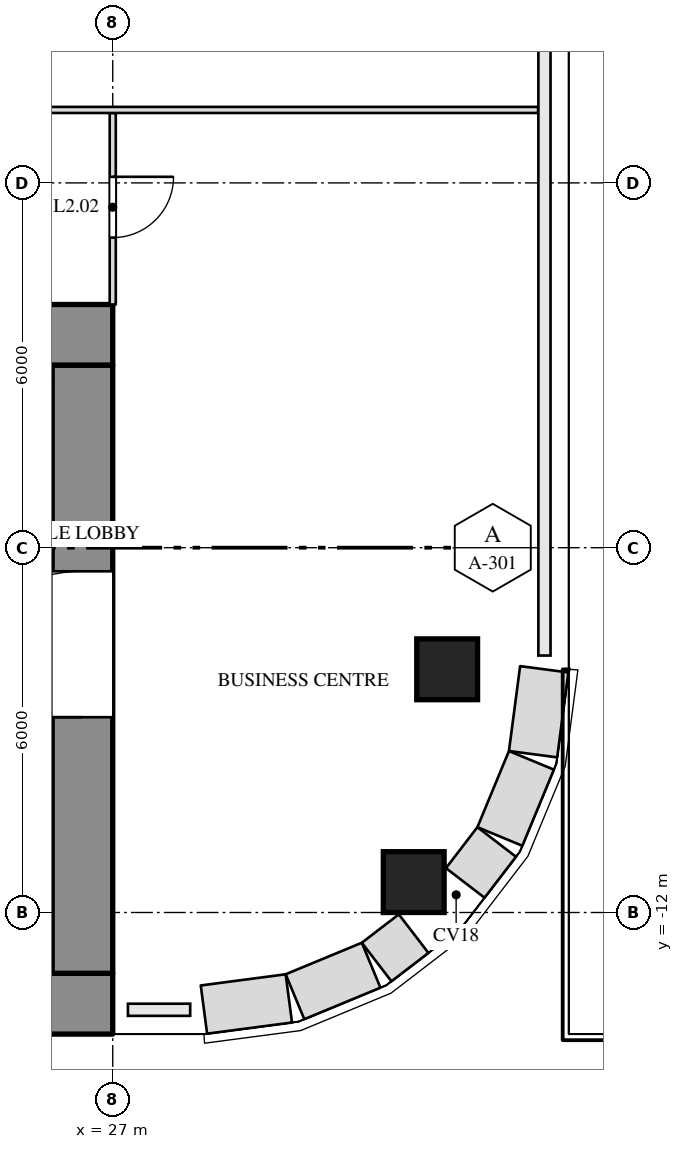
"""IFC4 building model, lengths in metres.
Left out: names, types, materials, properties, quantities, classifications, styles, units other than length and angle.
Written with IfcOpenShell. Run it as: python <this file> out.ifc"""

import sys

from ifc_helpers import new_model, si_unit, direction, frame, frame_2d, origin, origin_2d, place, context, subcontext, project, spatial, rectangle, extrude, element, fill, save


model = new_model("IFC4")
c1 = context("Model", 3, precision=1e-05, world=origin(), true_north=direction((0.0, 1.0)))
c2 = subcontext(c1, "Body", "Model", "MODEL_VIEW")
j1 = project(units=[si_unit("LENGTHUNIT", "METRE"), si_unit("PLANEANGLEUNIT", "RADIAN")], contexts=[c1])
p1 = place(None, origin())
s1 = spatial("IfcSite", under=j1, at=p1, CompositionType="ELEMENT")
p2 = place(p1, origin())
s2 = spatial("IfcBuilding", under=s1, at=p2, CompositionType="ELEMENT")
p3 = place(p2, frame((0.0, 0.0, 156.5)))
s3 = spatial("IfcBuildingStorey", under=s2, at=p3, CompositionType="ELEMENT", Elevation=156.5)
for number, where, z_axis, x_axis in (
    (1, (31.95, -11.5, 0.0), (0.0, 0.0, 1.0), (1.0, 0.0, 0.0)),
    (2, (32.5, -8.0, 0.0), (0.0, 0.0, 1.0), (1.0, 0.0, 0.0)),
):
    element("IfcColumn", number, at=place(p3, frame(where, z_axis=z_axis, x_axis=x_axis)), inside=s3, PredefinedType="COLUMN", context=c2, shape_type="SweptSolid", body=[
        extrude(rectangle(XDim=1.0, YDim=1.0, at=origin_2d()), origin(), (0.0, 0.0, 1.0), 4.0),
    ])
p4 = place(p3, frame((-27.0, -2.5, 0.0), z_axis=(0.0, 0.0, 1.0), x_axis=(1.0, 0.0, 0.0)))
e3 = element("IfcWall", 3, at=p4, inside=s3, PredefinedType="SHEAR", context=c2, shape_type="SweptSolid", body=[
    extrude(rectangle(XDim=54.0, YDim=1.0, at=frame_2d((27.0, 0.0))), origin(), (0.0, 0.0, 1.0), 3.65),
])
p5 = place(p4, frame((15.15, 0.0, 0.0)))
e4 = element("IfcOpeningElement", 4, at=p5, cuts=e3, PredefinedType="OPENING", context=c2, shape_type="SweptSolid", body=[
    extrude(rectangle(XDim=2.4, YDim=2.1, at=frame_2d((1.2, 1.05))), frame((0.0, 0.512, 0.0), z_axis=(0.0, -1.0, 0.0), x_axis=(1.0, 0.0, 0.0)), (0.0, 0.0, 1.0), 1.024),
])
p6 = place(p4, frame((36.45, 0.0, 0.0)))
e5 = element("IfcOpeningElement", 5, at=p6, cuts=e3, PredefinedType="OPENING", context=c2, shape_type="SweptSolid", body=[
    extrude(rectangle(XDim=2.4, YDim=2.1, at=frame_2d((1.2, 1.05))), frame((0.0, 0.512, 0.0), z_axis=(0.0, -1.0, 0.0), x_axis=(1.0, 0.0, 0.0)), (0.0, 0.0, 1.0), 1.024),
])
p7 = place(p3, frame((-27.0, -13.5, 0.0), z_axis=(0.0, 0.0, 1.0), x_axis=(1.0, 0.0, 0.0)))
e6 = element("IfcWall", 6, at=p7, inside=s3, PredefinedType="SHEAR", context=c2, shape_type="SweptSolid", body=[
    extrude(rectangle(XDim=54.0, YDim=1.0, at=frame_2d((27.0, 0.0))), origin(), (0.0, 0.0, 1.0), 3.65),
])
p8 = place(p7, frame((16.45, 0.0, 0.0)))
e7 = element("IfcOpeningElement", 7, at=p8, cuts=e6, PredefinedType="OPENING", context=c2, shape_type="SweptSolid", body=[
    extrude(rectangle(XDim=1.0, YDim=2.1, at=frame_2d((0.5, 1.05))), frame((0.0, 0.512, 0.0), z_axis=(0.0, -1.0, 0.0), x_axis=(1.0, 0.0, 0.0)), (0.0, 0.0, 1.0), 1.024),
])
p9 = place(p7, frame((36.55, 0.0, 0.0)))
e8 = element("IfcOpeningElement", 8, at=p9, cuts=e6, PredefinedType="OPENING", context=c2, shape_type="SweptSolid", body=[
    extrude(rectangle(XDim=1.0, YDim=2.1, at=frame_2d((0.5, 1.05))), frame((0.0, 0.512, 0.0), z_axis=(0.0, -1.0, 0.0), x_axis=(1.0, 0.0, 0.0)), (0.0, 0.0, 1.0), 1.024),
])
p10 = place(p3, frame((26.5, -13.0, 0.0), z_axis=(0.0, 0.0, 1.0), x_axis=(0.0, 1.0, 0.0)))
e9 = element("IfcWall", 9, at=p10, inside=s3, PredefinedType="SHEAR", context=c2, shape_type="SweptSolid", body=[
    extrude(rectangle(XDim=10.0, YDim=1.0, at=frame_2d((5.0, 0.0))), origin(), (0.0, 0.0, 1.0), 3.65),
])
p11 = place(p10, frame((4.212, 0.0, 0.0)))
e10 = element("IfcOpeningElement", 10, at=p11, cuts=e9, PredefinedType="OPENING", context=c2, shape_type="SweptSolid", body=[
    extrude(rectangle(XDim=2.4, YDim=2.1, at=frame_2d((1.2, 1.05))), frame((0.0, 0.512, 0.0), z_axis=(0.0, -1.0, 0.0), x_axis=(1.0, 0.0, 0.0)), (0.0, 0.0, 1.0), 1.024),
])
p12 = place(p3, frame((10.8, -12.9, 0.0), z_axis=(0.0, 0.0, 1.0), x_axis=(1.0, 0.0, 0.0)))
e11 = element("IfcWall", 11, at=p12, inside=s3, PredefinedType="SHEAR", context=c2, shape_type="SweptSolid", body=[
    extrude(rectangle(XDim=15.2, YDim=0.2, at=frame_2d((7.6, 0.0))), origin(), (0.0, 0.0, 1.0), 3.65),
])
p13 = place(p3, frame((27.0, -2.0, 0.0), z_axis=(0.0, 0.0, 1.0), x_axis=(0.0, 1.0, 0.0)))
e12 = element("IfcWall", 12, at=p13, inside=s3, PredefinedType="PARTITIONING", context=c2, shape_type="SweptSolid", body=[
    extrude(rectangle(XDim=3.15, YDim=0.1, at=frame_2d((1.575, 0.0))), origin(), (0.0, 0.0, 1.0), 3.038),
])
p14 = place(p13, frame((1.1, 0.0, 0.0)))
e13 = element("IfcOpeningElement", 13, at=p14, cuts=e12, PredefinedType="OPENING", context=c2, shape_type="SweptSolid", body=[
    extrude(rectangle(XDim=1.0, YDim=2.1, at=frame_2d((0.5, 1.05))), frame((0.0, 0.062, 0.0), z_axis=(0.0, -1.0, 0.0), x_axis=(1.0, 0.0, 0.0)), (0.0, 0.0, 1.0), 0.124),
])
p15 = place(p3, frame((-33.98, 1.2, 0.0), z_axis=(0.0, 0.0, 1.0), x_axis=(1.0, 0.0, 0.0)))
e14 = element("IfcWall", 14, at=p15, inside=s3, PredefinedType="PARTITIONING", context=c2, shape_type="SweptSolid", body=[
    extrude(rectangle(XDim=67.976, YDim=0.1, at=frame_2d((33.988, 0.0))), origin(), (0.0, 0.0, 1.0), 3.65),
])
p16 = place(p15, frame((8.38, 0.0, 0.0)))
e15 = element("IfcOpeningElement", 15, at=p16, cuts=e14, PredefinedType="OPENING", context=c2, shape_type="SweptSolid", body=[
    extrude(rectangle(XDim=1.8, YDim=2.1, at=frame_2d((0.9, 1.05))), frame((0.0, 0.062, 0.0), z_axis=(0.0, -1.0, 0.0), x_axis=(1.0, 0.0, 0.0)), (0.0, 0.0, 1.0), 0.124),
])
p17 = place(p15, frame((15.5, 0.0, 0.0)))
e16 = element("IfcOpeningElement", 16, at=p17, cuts=e14, PredefinedType="OPENING", context=c2, shape_type="SweptSolid", body=[
    extrude(rectangle(XDim=1.0, YDim=2.1, at=frame_2d((0.5, 1.05))), frame((0.0, 0.062, 0.0), z_axis=(0.0, -1.0, 0.0), x_axis=(1.0, 0.0, 0.0)), (0.0, 0.0, 1.0), 0.124),
])
p18 = place(p15, frame((24.01, 0.0, 0.0)))
e17 = element("IfcOpeningElement", 17, at=p18, cuts=e14, PredefinedType="OPENING", context=c2, shape_type="SweptSolid", body=[
    extrude(rectangle(XDim=1.8, YDim=2.1, at=frame_2d((0.9, 1.05))), frame((0.0, 0.062, 0.0), z_axis=(0.0, -1.0, 0.0), x_axis=(1.0, 0.0, 0.0)), (0.0, 0.0, 1.0), 0.124),
])
p19 = place(p15, frame((31.23, 0.0, 0.0)))
e18 = element("IfcOpeningElement", 18, at=p19, cuts=e14, PredefinedType="OPENING", context=c2, shape_type="SweptSolid", body=[
    extrude(rectangle(XDim=1.8, YDim=2.1, at=frame_2d((0.9, 1.05))), frame((0.0, 0.062, 0.0), z_axis=(0.0, -1.0, 0.0), x_axis=(1.0, 0.0, 0.0)), (0.0, 0.0, 1.0), 0.124),
])
p20 = place(p15, frame((44.66, 0.0, 0.0)))
e19 = element("IfcOpeningElement", 19, at=p20, cuts=e14, PredefinedType="OPENING", context=c2, shape_type="SweptSolid", body=[
    extrude(rectangle(XDim=1.8, YDim=2.1, at=frame_2d((0.9, 1.05))), frame((0.0, 0.062, 0.0), z_axis=(0.0, -1.0, 0.0), x_axis=(1.0, 0.0, 0.0)), (0.0, 0.0, 1.0), 0.124),
])
p21 = place(p15, frame((55.93, 0.0, 0.0)))
e20 = element("IfcOpeningElement", 20, at=p21, cuts=e14, PredefinedType="OPENING", context=c2, shape_type="SweptSolid", body=[
    extrude(rectangle(XDim=1.8, YDim=2.1, at=frame_2d((0.9, 1.05))), frame((0.0, 0.062, 0.0), z_axis=(0.0, -1.0, 0.0), x_axis=(1.0, 0.0, 0.0)), (0.0, 0.0, 1.0), 0.124),
])
p22 = place(p3, frame((28.5, -13.597, 0.0), z_axis=(0.0, 0.0, 1.0), x_axis=(0.99144603414, 0.130517283865, 0.0)))
e21 = element("IfcWall", 21, at=p22, inside=s3, PredefinedType="SOLIDWALL", context=c2, shape_type="SweptSolid", body=[
    extrude(rectangle(XDim=1.408, YDim=0.8, at=frame_2d((0.704, 0.0))), origin(), (0.0, 0.0, 1.0), 3.65),
])
p23 = place(p3, frame((29.997, -13.386, 0.0), z_axis=(0.0, 0.0, 1.0), x_axis=(0.923847774587, 0.38276009378, 0.0)))
e22 = element("IfcWall", 22, at=p23, inside=s3, PredefinedType="SOLIDWALL", context=c2, shape_type="SweptSolid", body=[
    extrude(rectangle(XDim=1.355, YDim=0.8, at=frame_2d((0.678, 0.0))), origin(), (0.0, 0.0, 1.0), 3.65),
])
p24 = place(p3, frame((31.34, -12.815, 0.0), z_axis=(0.0, 0.0, 1.0), x_axis=(0.793380840338, 0.608725588574, 0.0)))
e23 = element("IfcWall", 23, at=p24, inside=s3, PredefinedType="SOLIDWALL", context=c2, shape_type="SweptSolid", body=[
    extrude(rectangle(XDim=0.767, YDim=0.8, at=frame_2d((0.383, 0.0))), origin(), (0.0, 0.0, 1.0), 3.65),
])
p25 = place(p3, frame((32.798, -11.514, 0.0), z_axis=(0.0, 0.0, 1.0), x_axis=(0.608751445631, 0.793361000707, 0.0)))
e24 = element("IfcWall", 24, at=p25, inside=s3, PredefinedType="SOLIDWALL", context=c2, shape_type="SweptSolid", body=[
    extrude(rectangle(XDim=0.849, YDim=0.8, at=frame_2d((0.425, 0.0))), origin(), (0.0, 0.0, 1.0), 3.65),
])
p26 = place(p3, frame((33.367, -10.75, 0.0), z_axis=(0.0, 0.0, 1.0), x_axis=(0.38276009378, 0.923847774587, 0.0)))
e25 = element("IfcWall", 25, at=p26, inside=s3, PredefinedType="SOLIDWALL", context=c2, shape_type="SweptSolid", body=[
    extrude(rectangle(XDim=1.355, YDim=0.8, at=frame_2d((0.678, 0.0))), origin(), (0.0, 0.0, 1.0), 3.65),
])
p27 = place(p3, frame((33.913, -9.396, 0.0), z_axis=(0.0, 0.0, 1.0), x_axis=(0.130517283865, 0.99144603414, 0.0)))
e26 = element("IfcWall", 26, at=p27, inside=s3, PredefinedType="SOLIDWALL", context=c2, shape_type="SweptSolid", body=[
    extrude(rectangle(XDim=1.408, YDim=0.8, at=frame_2d((0.704, 0.0))), origin(), (0.0, 0.0, 1.0), 3.65),
])
p28 = place(p14, origin())
e27 = element("IfcDoor", 27, at=p28, inside=s3, OperationType="SINGLE_SWING_LEFT", PredefinedType="DOOR", context=c2, shape_type="SweptSolid", body=[
    extrude(rectangle(XDim=1.0, YDim=2.1, at=frame_2d((0.5, 1.05))), frame((0.0, 0.025, 0.0), z_axis=(0.0, -1.0, 0.0), x_axis=(1.0, 0.0, 0.0)), (0.0, 0.0, 1.0), 0.05),
])
fill(e13, e27)
p29 = place(p11, origin())
e28 = element("IfcDoor", 28, at=p29, inside=s3, OperationType="DOUBLE_DOOR_SINGLE_SWING", PredefinedType="DOOR", context=c2, shape_type="SweptSolid", body=[
    extrude(rectangle(XDim=2.4, YDim=2.1, at=frame_2d((1.2, 1.05))), frame((0.0, 0.025, 0.0), z_axis=(0.0, -1.0, 0.0), x_axis=(1.0, 0.0, 0.0)), (0.0, 0.0, 1.0), 0.05),
])
fill(e10, e28)
save(model, sys.argv[1])
